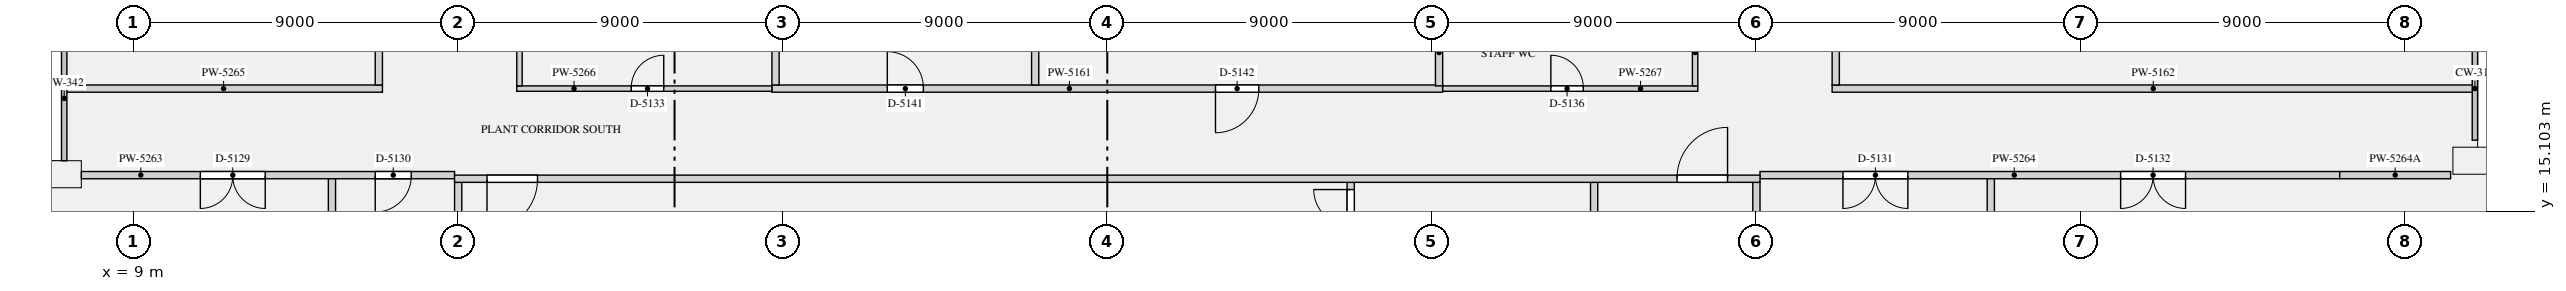
"""IFC4 building model, lengths in metres.
Left out: names, types, materials, properties, quantities, classifications, styles, units other than length and angle.
Written with IfcOpenShell. Run it as: python <this file> out.ifc"""

import sys

from ifc_helpers import new_model, si_unit, direction, frame, frame_2d, origin, origin_2d, place, context, subcontext, project, spatial, rectangle, extrude, element, fill, save


model = new_model("IFC4")
c1 = context("Model", 3, precision=1e-05, world=origin(), true_north=direction((0.0, 1.0)))
c2 = subcontext(c1, "Body", "Model", "MODEL_VIEW")
j1 = project(units=[si_unit("LENGTHUNIT", "METRE"), si_unit("PLANEANGLEUNIT", "RADIAN")], contexts=[c1])
p1 = place(None, origin())
s1 = spatial("IfcSite", under=j1, at=p1, CompositionType="ELEMENT")
p2 = place(p1, origin())
s2 = spatial("IfcBuilding", under=s1, at=p2, CompositionType="ELEMENT")
p3 = place(p2, frame((0.0, 0.0, 137.1)))
s3 = spatial("IfcBuildingStorey", under=s2, at=p3, CompositionType="ELEMENT", Elevation=137.1)
p4 = place(p3, frame((7.0, 16.125, 0.0), z_axis=(0.0, 0.0, 1.0), x_axis=(-1.0, 0.0, 0.0)))
e1 = element("IfcColumn", 1, at=p4, inside=s3, PredefinedType="USERDEFINED", context=c2, shape_type="SweptSolid", body=[
    extrude(rectangle(XDim=1.1, YDim=0.75, at=origin_2d()), origin(), (0.0, 0.0, 1.0), 4.2),
])
p5 = place(p3, frame((76.054, 16.125, -0.098), z_axis=(-0.727236062663, 0.004086079131, 0.686375271349), x_axis=(0.686364437468, -0.003856436099, 0.72724754168)))
e2 = element("IfcColumn", 2, at=p5, inside=s3, PredefinedType="USERDEFINED", context=c2, shape_type="SweptSolid", body=[
    extrude(rectangle(XDim=1.1, YDim=0.75, at=origin_2d()), origin(), (0.0, 0.0, 1.0), 5.676),
])
p6 = place(p3, frame((73.864, 16.5, -0.225), z_axis=(-0.729141513294, 0.0, 0.684362954572), x_axis=(0.0, -1.0, 0.0)))
e3 = element("IfcColumn", 3, at=p6, inside=s3, PredefinedType="USERDEFINED", context=c2, shape_type="SweptSolid", body=[
    extrude(rectangle(XDim=1.1, YDim=0.75, at=origin_2d()), origin(), (0.0, 0.0, 1.0), 6.063),
])
p7 = place(p3, frame((18.0, 12.5, 0.0), z_axis=(0.0, 0.0, 1.0), x_axis=(0.0, 1.0, 0.0)))
e4 = element("IfcWall", 4, at=p7, inside=s3, PredefinedType="PARTITIONING", context=c2, shape_type="SweptSolid", body=[
    extrude(rectangle(XDim=3.4, YDim=0.2, at=frame_2d((1.7, 0.0))), origin(), (0.0, 0.0, 1.0), 3.7),
])
p8 = place(p3, frame((42.75, 12.5, 0.0), z_axis=(0.0, 0.0, 1.0), x_axis=(0.0, 1.0, 0.0)))
e5 = element("IfcWall", 5, at=p8, inside=s3, PredefinedType="PARTITIONING", context=c2, shape_type="SweptSolid", body=[
    extrude(rectangle(XDim=3.4, YDim=0.2, at=frame_2d((1.7, 0.0))), origin(), (0.0, 0.0, 1.0), 3.7),
])
p9 = place(p8, frame((2.2, 0.0, 0.0)))
e6 = element("IfcOpeningElement", 6, at=p9, cuts=e5, PredefinedType="OPENING", context=c2, shape_type="SweptSolid", body=[
    extrude(rectangle(XDim=1.0, YDim=2.1, at=frame_2d((0.5, 1.05))), frame((0.0, 0.11, 0.0), z_axis=(0.0, -1.0, 0.0), x_axis=(1.0, 0.0, 0.0)), (0.0, 0.0, 1.0), 0.22),
])
p10 = place(p3, frame((49.5, 12.5, 0.0), z_axis=(0.0, 0.0, 1.0), x_axis=(0.0, 1.0, 0.0)))
e7 = element("IfcWall", 7, at=p10, inside=s3, PredefinedType="PARTITIONING", context=c2, shape_type="SweptSolid", body=[
    extrude(rectangle(XDim=3.4, YDim=0.2, at=frame_2d((1.7, 0.0))), origin(), (0.0, 0.0, 1.0), 3.7),
])
p11 = place(p10, frame((1.15, 0.0, 0.0)))
e8 = element("IfcOpeningElement", 8, at=p11, cuts=e7, PredefinedType="OPENING", context=c2, shape_type="SweptSolid", body=[
    extrude(rectangle(XDim=1.1, YDim=2.1, at=frame_2d((0.55, 1.05))), frame((0.0, 0.11, 0.0), z_axis=(0.0, -1.0, 0.0), x_axis=(1.0, 0.0, 0.0)), (0.0, 0.0, 1.0), 0.22),
])
p12 = place(p3, frame((54.0, 12.5, 0.0), z_axis=(0.0, 0.0, 1.0), x_axis=(0.0, 1.0, 0.0)))
e9 = element("IfcWall", 9, at=p12, inside=s3, PredefinedType="PARTITIONING", context=c2, shape_type="SweptSolid", body=[
    extrude(rectangle(XDim=3.4, YDim=0.2, at=frame_2d((1.7, 0.0))), origin(), (0.0, 0.0, 1.0), 3.7),
])
p13 = place(p3, frame((17.9, 16.0, 0.0), z_axis=(0.0, 0.0, 1.0), x_axis=(1.0, 0.0, 0.0)))
e10 = element("IfcWall", 10, at=p13, inside=s3, PredefinedType="PARTITIONING", context=c2, shape_type="SweptSolid", body=[
    extrude(rectangle(XDim=36.2, YDim=0.2, at=frame_2d((18.1, 0.0))), origin(), (0.0, 0.0, 1.0), 3.7),
])
p14 = place(p13, frame((0.9, 0.0, 0.0)))
e11 = element("IfcOpeningElement", 11, at=p14, cuts=e10, PredefinedType="OPENING", context=c2, shape_type="SweptSolid", body=[
    extrude(rectangle(XDim=1.4, YDim=2.1, at=frame_2d((0.7, 1.05))), frame((0.0, 0.11, 0.0), z_axis=(0.0, -1.0, 0.0), x_axis=(1.0, 0.0, 0.0)), (0.0, 0.0, 1.0), 0.22),
])
p15 = place(p13, frame((33.9, 0.0, 0.0)))
e12 = element("IfcOpeningElement", 12, at=p15, cuts=e10, PredefinedType="OPENING", context=c2, shape_type="SweptSolid", body=[
    extrude(rectangle(XDim=1.4, YDim=2.1, at=frame_2d((0.7, 1.05))), frame((0.0, 0.11, 0.0), z_axis=(0.0, -1.0, 0.0), x_axis=(1.0, 0.0, 0.0)), (0.0, 0.0, 1.0), 0.22),
])
p16 = place(p3, frame((7.55, 16.1, 0.0), z_axis=(0.0, 0.0, 1.0), x_axis=(1.0, 0.0, 0.0)))
e13 = element("IfcWall", 13, at=p16, inside=s3, PredefinedType="PARTITIONING", context=c2, shape_type="SweptSolid", body=[
    extrude(rectangle(XDim=10.35, YDim=0.2, at=frame_2d((5.175, 0.0))), origin(), (0.0, 0.0, 1.0), 3.7),
])
p17 = place(p16, frame((3.3, 0.0, 0.0)))
e14 = element("IfcOpeningElement", 14, at=p17, cuts=e13, PredefinedType="OPENING", context=c2, shape_type="SweptSolid", body=[
    extrude(rectangle(XDim=1.8, YDim=2.1, at=frame_2d((0.9, 1.05))), frame((0.0, 0.11, 0.0), z_axis=(0.0, -1.0, 0.0), x_axis=(1.0, 0.0, 0.0)), (0.0, 0.0, 1.0), 0.22),
])
p18 = place(p16, frame((8.15, 0.0, 0.0)))
e15 = element("IfcOpeningElement", 15, at=p18, cuts=e13, PredefinedType="OPENING", context=c2, shape_type="SweptSolid", body=[
    extrude(rectangle(XDim=1.0, YDim=2.1, at=frame_2d((0.5, 1.05))), frame((0.0, 0.11, 0.0), z_axis=(0.0, -1.0, 0.0), x_axis=(1.0, 0.0, 0.0)), (0.0, 0.0, 1.0), 0.22),
])
p19 = place(p3, frame((54.1, 16.1, 0.0), z_axis=(0.0, 0.0, 1.0), x_axis=(1.0, 0.0, 0.0)))
e16 = element("IfcWall", 16, at=p19, inside=s3, PredefinedType="PARTITIONING", context=c2, shape_type="SweptSolid", body=[
    extrude(rectangle(XDim=16.075, YDim=0.2, at=frame_2d((8.038, 0.0))), origin(), (0.0, 0.0, 1.0), 3.7),
])
p20 = place(p19, frame((2.3, 0.0, 0.0)))
e17 = element("IfcOpeningElement", 17, at=p20, cuts=e16, PredefinedType="OPENING", context=c2, shape_type="SweptSolid", body=[
    extrude(rectangle(XDim=1.8, YDim=2.1, at=frame_2d((0.9, 1.05))), frame((0.0, 0.11, 0.0), z_axis=(0.0, -1.0, 0.0), x_axis=(1.0, 0.0, 0.0)), (0.0, 0.0, 1.0), 0.22),
])
p21 = place(p19, frame((10.0, 0.0, 0.0)))
e18 = element("IfcOpeningElement", 18, at=p21, cuts=e16, PredefinedType="OPENING", context=c2, shape_type="SweptSolid", body=[
    extrude(rectangle(XDim=1.8, YDim=2.1, at=frame_2d((0.9, 1.05))), frame((0.0, 0.11, 0.0), z_axis=(0.0, -1.0, 0.0), x_axis=(1.0, 0.0, 0.0)), (0.0, 0.0, 1.0), 0.22),
])
p22 = place(p3, frame((70.175, 16.1, 0.0), z_axis=(0.0, 0.0, 1.0), x_axis=(1.0, 0.0, 0.0)))
e19 = element("IfcWall", 19, at=p22, inside=s3, PredefinedType="PARTITIONING", context=c2, shape_type="SweptSolid", body=[
    extrude(rectangle(XDim=3.075, YDim=0.2, at=frame_2d((1.538, 0.0))), origin(), (0.0, 0.0, 1.0), 2.8),
])
p23 = place(p3, frame((7.09, 18.5, 0.0), z_axis=(0.0, 0.0, 1.0), x_axis=(1.0, 0.0, 0.0)))
e20 = element("IfcWall", 20, at=p23, inside=s3, PredefinedType="PARTITIONING", context=c2, shape_type="SweptSolid", body=[
    extrude(rectangle(XDim=8.81, YDim=0.2, at=frame_2d((4.405, 0.0))), origin(), (0.0, 0.0, 1.0), 3.7),
])
p24 = place(p3, frame((26.7, 18.5, 0.0), z_axis=(0.0, 0.0, 1.0), x_axis=(1.0, 0.0, 0.0)))
e21 = element("IfcWall", 21, at=p24, inside=s3, PredefinedType="PARTITIONING", context=c2, shape_type="SweptSolid", body=[
    extrude(rectangle(XDim=18.6, YDim=0.2, at=frame_2d((9.3, 0.0))), origin(), (0.0, 0.0, 1.0), 3.7),
])
p25 = place(p24, frame((3.2, 0.0, 0.0)))
e22 = element("IfcOpeningElement", 22, at=p25, cuts=e21, PredefinedType="OPENING", context=c2, shape_type="SweptSolid", body=[
    extrude(rectangle(XDim=1.0, YDim=2.1, at=frame_2d((0.5, 1.05))), frame((0.0, 0.11, 0.0), z_axis=(0.0, -1.0, 0.0), x_axis=(1.0, 0.0, 0.0)), (0.0, 0.0, 1.0), 0.22),
])
p26 = place(p24, frame((12.3, 0.0, 0.0)))
e23 = element("IfcOpeningElement", 23, at=p26, cuts=e21, PredefinedType="OPENING", context=c2, shape_type="SweptSolid", body=[
    extrude(rectangle(XDim=1.2, YDim=2.1, at=frame_2d((0.6, 1.05))), frame((0.0, 0.11, 0.0), z_axis=(0.0, -1.0, 0.0), x_axis=(1.0, 0.0, 0.0)), (0.0, 0.0, 1.0), 0.22),
])
p27 = place(p3, frame((56.1, 18.5, 0.0), z_axis=(0.0, 0.0, 1.0), x_axis=(1.0, 0.0, 0.0)))
e24 = element("IfcWall", 24, at=p27, inside=s3, PredefinedType="PARTITIONING", context=c2, shape_type="SweptSolid", body=[
    extrude(rectangle(XDim=17.81, YDim=0.2, at=frame_2d((8.905, 0.0))), origin(), (0.0, 0.0, 1.0), 3.7),
])
p28 = place(p3, frame((19.625, 18.5, 0.0), z_axis=(0.0, 0.0, 1.0), x_axis=(1.0, 0.0, 0.0)))
e25 = element("IfcWall", 25, at=p28, inside=s3, PredefinedType="PARTITIONING", context=c2, shape_type="SweptSolid", body=[
    extrude(rectangle(XDim=7.075, YDim=0.15, at=frame_2d((3.538, 0.0))), origin(), (0.0, 0.0, 1.0), 3.7),
])
p29 = place(p28, frame((3.175, 0.0, 0.0)))
e26 = element("IfcOpeningElement", 26, at=p29, cuts=e25, PredefinedType="OPENING", context=c2, shape_type="SweptSolid", body=[
    extrude(rectangle(XDim=0.9, YDim=2.1, at=frame_2d((0.45, 1.05))), frame((0.0, 0.085, 0.0), z_axis=(0.0, -1.0, 0.0), x_axis=(1.0, 0.0, 0.0)), (0.0, 0.0, 1.0), 0.17),
])
p30 = place(p3, frame((45.3, 18.5, 0.0), z_axis=(0.0, 0.0, 1.0), x_axis=(1.0, 0.0, 0.0)))
e27 = element("IfcWall", 27, at=p30, inside=s3, PredefinedType="PARTITIONING", context=c2, shape_type="SweptSolid", body=[
    extrude(rectangle(XDim=7.075, YDim=0.15, at=frame_2d((3.538, 0.0))), origin(), (0.0, 0.0, 1.0), 3.7),
])
p31 = place(p30, frame((3.0, 0.0, 0.0)))
e28 = element("IfcOpeningElement", 28, at=p31, cuts=e27, PredefinedType="OPENING", context=c2, shape_type="SweptSolid", body=[
    extrude(rectangle(XDim=0.9, YDim=2.1, at=frame_2d((0.45, 1.05))), frame((0.0, 0.085, 0.0), z_axis=(0.0, -1.0, 0.0), x_axis=(1.0, 0.0, 0.0)), (0.0, 0.0, 1.0), 0.17),
])
for number, where, z_axis, x_axis in (
    (29, (14.5, 0.09, 0.0), (0.0, 0.0, 1.0), (0.0, 1.0, 0.0)),
    (30, (60.5, 0.09, 0.0), (0.0, 0.0, 1.0), (0.0, 1.0, 0.0)),
):
    element("IfcWall", number, at=place(p3, frame(where, z_axis=z_axis, x_axis=x_axis)), inside=s3, PredefinedType="PARTITIONING", context=c2, shape_type="SweptSolid", body=[
        extrude(rectangle(XDim=15.91, YDim=0.2, at=frame_2d((7.955, 0.0))), origin(), (0.0, 0.0, 1.0), 3.7),
    ])
p32 = place(p3, frame((19.7, 18.575, 0.0), z_axis=(0.0, 0.0, 1.0), x_axis=(0.0, 1.0, 0.0)))
e31 = element("IfcWall", 31, at=p32, inside=s3, PredefinedType="PARTITIONING", context=c2, shape_type="SweptSolid", body=[
    extrude(rectangle(XDim=4.85, YDim=0.15, at=frame_2d((2.425, 0.0))), origin(), (0.0, 0.0, 1.0), 3.7),
])
p33 = place(p3, frame((45.2, 18.575, 0.0), z_axis=(0.0, 0.0, 1.0), x_axis=(0.0, 1.0, 0.0)))
e32 = element("IfcWall", 32, at=p33, inside=s3, PredefinedType="PARTITIONING", context=c2, shape_type="SweptSolid", body=[
    extrude(rectangle(XDim=1.85, YDim=0.2, at=frame_2d((0.925, 0.0))), origin(), (0.0, 0.0, 1.0), 3.7),
])
p34 = place(p3, frame((52.3, 18.575, 0.0), z_axis=(0.0, 0.0, 1.0), x_axis=(0.0, 1.0, 0.0)))
e33 = element("IfcWall", 33, at=p34, inside=s3, PredefinedType="PARTITIONING", context=c2, shape_type="SweptSolid", body=[
    extrude(rectangle(XDim=1.85, YDim=0.15, at=frame_2d((0.925, 0.0))), origin(), (0.0, 0.0, 1.0), 3.7),
])
p35 = place(p3, frame((15.8, 18.6, 0.0), z_axis=(0.0, 0.0, 1.0), x_axis=(0.0, 1.0, 0.0)))
e34 = element("IfcWall", 34, at=p35, inside=s3, PredefinedType="PARTITIONING", context=c2, shape_type="SweptSolid", body=[
    extrude(rectangle(XDim=4.3, YDim=0.2, at=frame_2d((2.15, 0.0))), origin(), (0.0, 0.0, 1.0), 3.7),
])
p36 = place(p3, frame((26.8, 18.6, 0.0), z_axis=(0.0, 0.0, 1.0), x_axis=(0.0, 1.0, 0.0)))
e35 = element("IfcWall", 35, at=p36, inside=s3, PredefinedType="PARTITIONING", context=c2, shape_type="SweptSolid", body=[
    extrude(rectangle(XDim=5.1, YDim=0.2, at=frame_2d((2.55, 0.0))), origin(), (0.0, 0.0, 1.0), 3.7),
])
p37 = place(p3, frame((34.0, 18.6, 0.0), z_axis=(0.0, 0.0, 1.0), x_axis=(0.0, 1.0, 0.0)))
e36 = element("IfcWall", 36, at=p37, inside=s3, PredefinedType="PARTITIONING", context=c2, shape_type="SweptSolid", body=[
    extrude(rectangle(XDim=5.304, YDim=0.2, at=frame_2d((2.652, 0.0))), origin(), (0.0, 0.0, 1.0), 3.7),
])
p38 = place(p3, frame((56.2, 18.6, 0.0), z_axis=(0.0, 0.0, 1.0), x_axis=(0.0, 1.0, 0.0)))
e37 = element("IfcWall", 37, at=p38, inside=s3, PredefinedType="PARTITIONING", context=c2, shape_type="SweptSolid", body=[
    extrude(rectangle(XDim=4.3, YDim=0.2, at=frame_2d((2.15, 0.0))), origin(), (0.0, 0.0, 1.0), 3.7),
])
p39 = place(p9, origin())
e38 = element("IfcDoor", 38, at=p39, inside=s3, OperationType="SINGLE_SWING_RIGHT", PredefinedType="DOOR", context=c2, shape_type="SweptSolid", body=[
    extrude(rectangle(XDim=1.0, YDim=2.1, at=frame_2d((0.5, 1.05))), frame((0.0, 0.025, 0.0), z_axis=(0.0, -1.0, 0.0), x_axis=(1.0, 0.0, 0.0)), (0.0, 0.0, 1.0), 0.05),
])
fill(e6, e38)
p40 = place(p14, frame((1.4, 0.0, 0.0), z_axis=(0.0, 0.0, 1.0), x_axis=(-1.0, 0.0, 0.0)))
e39 = element("IfcDoor", 39, at=p40, inside=s3, OperationType="SINGLE_SWING_RIGHT", PredefinedType="DOOR", context=c2, shape_type="SweptSolid", body=[
    extrude(rectangle(XDim=1.4, YDim=2.1, at=frame_2d((0.7, 1.05))), frame((0.0, 0.025, 0.0), z_axis=(0.0, -1.0, 0.0), x_axis=(1.0, 0.0, 0.0)), (0.0, 0.0, 1.0), 0.05),
])
fill(e11, e39)
p41 = place(p15, origin())
e40 = element("IfcDoor", 40, at=p41, inside=s3, OperationType="SINGLE_SWING_RIGHT", PredefinedType="DOOR", context=c2, shape_type="SweptSolid", body=[
    extrude(rectangle(XDim=1.4, YDim=2.1, at=frame_2d((0.7, 1.05))), frame((0.0, 0.025, 0.0), z_axis=(0.0, -1.0, 0.0), x_axis=(1.0, 0.0, 0.0)), (0.0, 0.0, 1.0), 0.05),
])
fill(e12, e40)
p42 = place(p17, frame((1.8, 0.0, 0.0), z_axis=(0.0, 0.0, 1.0), x_axis=(-1.0, 0.0, 0.0)))
e41 = element("IfcDoor", 41, at=p42, inside=s3, OperationType="DOUBLE_DOOR_SINGLE_SWING", PredefinedType="DOOR", context=c2, shape_type="SweptSolid", body=[
    extrude(rectangle(XDim=1.8, YDim=2.1, at=frame_2d((0.9, 1.05))), frame((0.0, 0.025, 0.0), z_axis=(0.0, -1.0, 0.0), x_axis=(1.0, 0.0, 0.0)), (0.0, 0.0, 1.0), 0.05),
])
fill(e14, e41)
p43 = place(p18, frame((1.0, 0.0, 0.0), z_axis=(0.0, 0.0, 1.0), x_axis=(-1.0, 0.0, 0.0)))
e42 = element("IfcDoor", 42, at=p43, inside=s3, OperationType="SINGLE_SWING_RIGHT", PredefinedType="DOOR", context=c2, shape_type="SweptSolid", body=[
    extrude(rectangle(XDim=1.0, YDim=2.1, at=frame_2d((0.5, 1.05))), frame((0.0, 0.025, 0.0), z_axis=(0.0, -1.0, 0.0), x_axis=(1.0, 0.0, 0.0)), (0.0, 0.0, 1.0), 0.05),
])
fill(e15, e42)
p44 = place(p20, frame((1.8, 0.0, 0.0), z_axis=(0.0, 0.0, 1.0), x_axis=(-1.0, 0.0, 0.0)))
e43 = element("IfcDoor", 43, at=p44, inside=s3, OperationType="DOUBLE_DOOR_SINGLE_SWING", PredefinedType="DOOR", context=c2, shape_type="SweptSolid", body=[
    extrude(rectangle(XDim=1.8, YDim=2.1, at=frame_2d((0.9, 1.05))), frame((0.0, 0.025, 0.0), z_axis=(0.0, -1.0, 0.0), x_axis=(1.0, 0.0, 0.0)), (0.0, 0.0, 1.0), 0.05),
])
fill(e17, e43)
p45 = place(p21, frame((1.8, 0.0, 0.0), z_axis=(0.0, 0.0, 1.0), x_axis=(-1.0, 0.0, 0.0)))
e44 = element("IfcDoor", 44, at=p45, inside=s3, OperationType="DOUBLE_DOOR_SINGLE_SWING", PredefinedType="DOOR", context=c2, shape_type="SweptSolid", body=[
    extrude(rectangle(XDim=1.8, YDim=2.1, at=frame_2d((0.9, 1.05))), frame((0.0, 0.025, 0.0), z_axis=(0.0, -1.0, 0.0), x_axis=(1.0, 0.0, 0.0)), (0.0, 0.0, 1.0), 0.05),
])
fill(e18, e44)
p46 = place(p29, origin())
e45 = element("IfcDoor", 45, at=p46, inside=s3, OperationType="SINGLE_SWING_RIGHT", PredefinedType="DOOR", context=c2, shape_type="SweptSolid", body=[
    extrude(rectangle(XDim=0.9, YDim=2.1, at=frame_2d((0.45, 1.05))), frame((0.0, 0.025, 0.0), z_axis=(0.0, -1.0, 0.0), x_axis=(1.0, 0.0, 0.0)), (0.0, 0.0, 1.0), 0.05),
])
fill(e26, e45)
p47 = place(p31, origin())
e46 = element("IfcDoor", 46, at=p47, inside=s3, OperationType="SINGLE_SWING_LEFT", PredefinedType="DOOR", context=c2, shape_type="SweptSolid", body=[
    extrude(rectangle(XDim=0.9, YDim=2.1, at=frame_2d((0.45, 1.05))), frame((0.0, 0.025, 0.0), z_axis=(0.0, -1.0, 0.0), x_axis=(1.0, 0.0, 0.0)), (0.0, 0.0, 1.0), 0.05),
])
fill(e28, e46)
p48 = place(p25, origin())
e47 = element("IfcDoor", 47, at=p48, inside=s3, OperationType="SINGLE_SWING_LEFT", PredefinedType="DOOR", context=c2, shape_type="SweptSolid", body=[
    extrude(rectangle(XDim=1.0, YDim=2.1, at=frame_2d((0.5, 1.05))), frame((0.0, 0.025, 0.0), z_axis=(0.0, -1.0, 0.0), x_axis=(1.0, 0.0, 0.0)), (0.0, 0.0, 1.0), 0.05),
])
fill(e22, e47)
p49 = place(p26, frame((1.2, 0.0, 0.0), z_axis=(0.0, 0.0, 1.0), x_axis=(-1.0, 0.0, 0.0)))
e48 = element("IfcDoor", 48, at=p49, inside=s3, OperationType="SINGLE_SWING_RIGHT", PredefinedType="DOOR", context=c2, shape_type="SweptSolid", body=[
    extrude(rectangle(XDim=1.2, YDim=2.1, at=frame_2d((0.6, 1.05))), frame((0.0, 0.025, 0.0), z_axis=(0.0, -1.0, 0.0), x_axis=(1.0, 0.0, 0.0)), (0.0, 0.0, 1.0), 0.05),
])
fill(e23, e48)
save(model, sys.argv[1])
